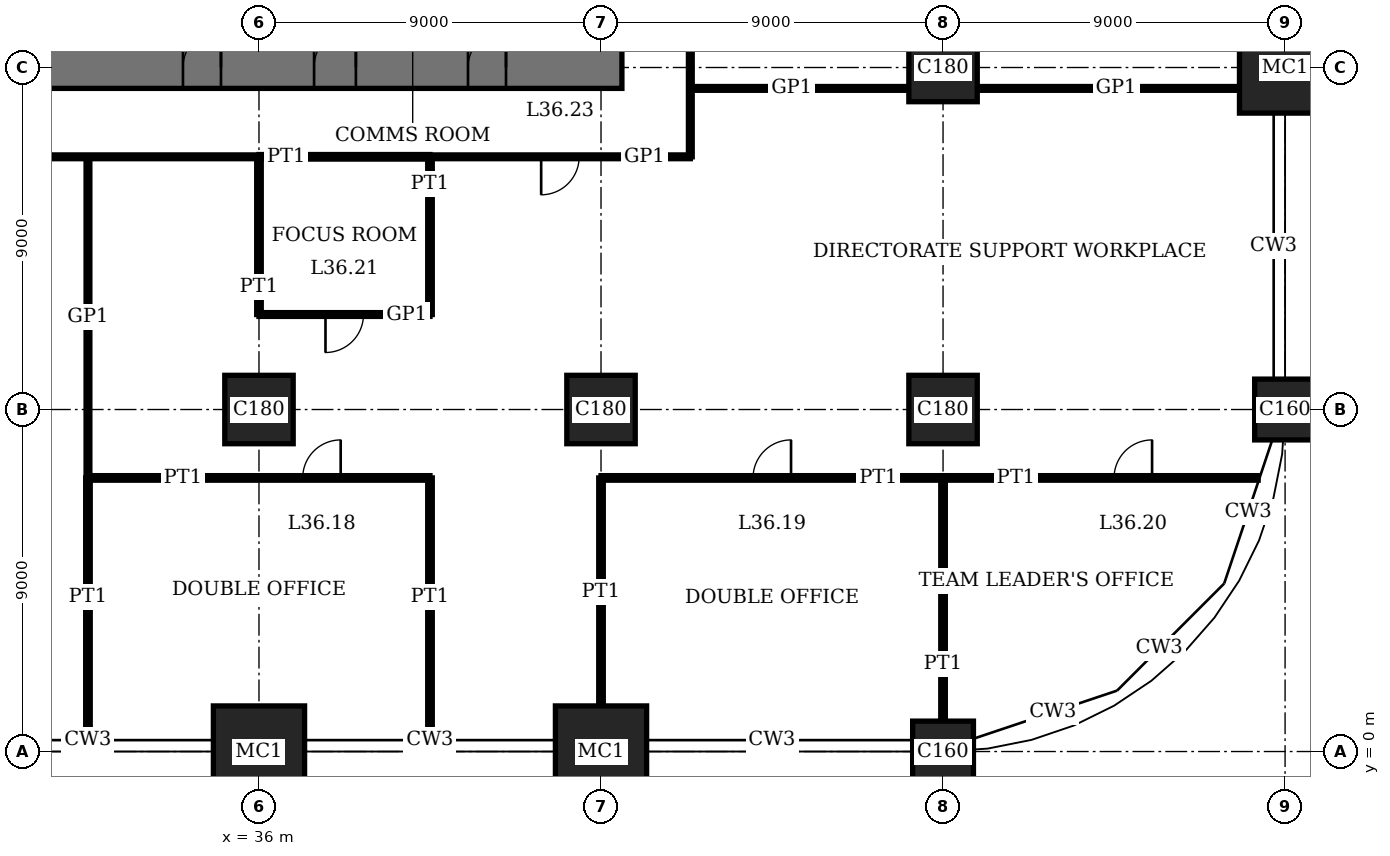
"""IFC4 building model, lengths in metres.
Left out: names, types, materials, properties, quantities, classifications, styles, units other than length and angle.
Written with IfcOpenShell. Run it as: python <this file> out.ifc"""

import sys

from ifc_helpers import new_model, si_unit, direction, frame, frame_2d, origin, origin_2d, place, context, subcontext, project, spatial, rectangle, extrude, element, fill, save


model = new_model("IFC4")
c1 = context("Model", 3, precision=1e-05, world=origin(), true_north=direction((0.0, 1.0)))
c2 = subcontext(c1, "Body", "Model", "MODEL_VIEW")
j1 = project(units=[si_unit("LENGTHUNIT", "METRE"), si_unit("PLANEANGLEUNIT", "RADIAN")], contexts=[c1])
p1 = place(None, origin())
s1 = spatial("IfcSite", under=j1, at=p1, CompositionType="ELEMENT")
p2 = place(p1, origin())
s2 = spatial("IfcBuilding", under=s1, at=p2, CompositionType="ELEMENT")
p3 = place(p2, frame((0.0, 0.0, 149.0)))
s3 = spatial("IfcBuildingStorey", under=s2, at=p3, CompositionType="ELEMENT", Elevation=149.0)
p4 = place(p3, frame((36.0, 0.0, 0.0), z_axis=(0.0, 0.0, 1.0), x_axis=(1.0, 0.0, 0.0)))
e1 = element("IfcColumn", 1, at=p4, inside=s3, PredefinedType="COLUMN", context=c2, shape_type="SweptSolid", body=[
    extrude(rectangle(XDim=2.4, YDim=2.4, at=origin_2d()), origin(), (0.0, 0.0, 1.0), 4.0),
])
p5 = place(p3, frame((36.0, 9.0, 0.0), z_axis=(0.0, 0.0, 1.0), x_axis=(1.0, 0.0, 0.0)))
e2 = element("IfcColumn", 2, at=p5, inside=s3, PredefinedType="COLUMN", context=c2, shape_type="SweptSolid", body=[
    extrude(rectangle(XDim=1.8, YDim=1.8, at=origin_2d()), origin(), (0.0, 0.0, 1.0), 4.0),
])
p6 = place(p3, frame((45.0, 0.0, 0.0), z_axis=(0.0, 0.0, 1.0), x_axis=(1.0, 0.0, 0.0)))
e3 = element("IfcColumn", 3, at=p6, inside=s3, PredefinedType="COLUMN", context=c2, shape_type="SweptSolid", body=[
    extrude(rectangle(XDim=2.4, YDim=2.4, at=origin_2d()), origin(), (0.0, 0.0, 1.0), 4.0),
])
p7 = place(p3, frame((45.0, 9.0, 0.0), z_axis=(0.0, 0.0, 1.0), x_axis=(1.0, 0.0, 0.0)))
e4 = element("IfcColumn", 4, at=p7, inside=s3, PredefinedType="COLUMN", context=c2, shape_type="SweptSolid", body=[
    extrude(rectangle(XDim=1.8, YDim=1.8, at=origin_2d()), origin(), (0.0, 0.0, 1.0), 4.0),
])
p8 = place(p3, frame((54.0, 0.0, 0.0), z_axis=(0.0, 0.0, 1.0), x_axis=(1.0, 0.0, 0.0)))
e5 = element("IfcColumn", 5, at=p8, inside=s3, PredefinedType="COLUMN", context=c2, shape_type="SweptSolid", body=[
    extrude(rectangle(XDim=1.6, YDim=1.6, at=origin_2d()), origin(), (0.0, 0.0, 1.0), 4.0),
])
for number, where, z_axis, x_axis in (
    (6, (54.0, 9.0, 0.0), (0.0, 0.0, 1.0), (1.0, 0.0, 0.0)),
    (7, (54.0, 18.0, 0.0), (0.0, 0.0, 1.0), (1.0, 0.0, 0.0)),
):
    element("IfcColumn", number, at=place(p3, frame(where, z_axis=z_axis, x_axis=x_axis)), inside=s3, PredefinedType="COLUMN", context=c2, shape_type="SweptSolid", body=[
        extrude(rectangle(XDim=1.8, YDim=1.8, at=origin_2d()), origin(), (0.0, 0.0, 1.0), 4.0),
    ])
p9 = place(p3, frame((63.0, 9.0, 0.0), z_axis=(0.0, 0.0, 1.0), x_axis=(1.0, 0.0, 0.0)))
e8 = element("IfcColumn", 8, at=p9, inside=s3, PredefinedType="COLUMN", context=c2, shape_type="SweptSolid", body=[
    extrude(rectangle(XDim=1.6, YDim=1.6, at=origin_2d()), origin(), (0.0, 0.0, 1.0), 4.0),
])
p10 = place(p3, frame((63.0, 18.0, 0.0), z_axis=(0.0, 0.0, 1.0), x_axis=(1.0, 0.0, 0.0)))
e9 = element("IfcColumn", 9, at=p10, inside=s3, PredefinedType="COLUMN", context=c2, shape_type="SweptSolid", body=[
    extrude(rectangle(XDim=2.4, YDim=2.4, at=origin_2d()), origin(), (0.0, 0.0, 1.0), 4.0),
])
p11 = place(p3, frame((17.45, 18.0, 0.0), z_axis=(0.0, 0.0, 1.0), x_axis=(1.0, 0.0, 0.0)))
e10 = element("IfcWall", 10, at=p11, inside=s3, PredefinedType="SHEAR", context=c2, shape_type="SweptSolid", body=[
    extrude(rectangle(XDim=28.1, YDim=1.1, at=frame_2d((14.05, 0.0))), origin(), (0.0, 0.0, 1.0), 4.0),
])
p12 = place(p11, frame((11.55, 0.0, 0.0)))
e11 = element("IfcOpeningElement", 11, at=p12, cuts=e10, PredefinedType="OPENING", context=c2, shape_type="SweptSolid", body=[
    extrude(rectangle(XDim=1.0, YDim=2.4, at=frame_2d((0.5, 1.2))), frame((0.0, 0.56, 0.0), z_axis=(0.0, -1.0, 0.0), x_axis=(1.0, 0.0, 0.0)), (0.0, 0.0, 1.0), 1.12),
])
p13 = place(p11, frame((16.55, 0.0, 0.0)))
e12 = element("IfcOpeningElement", 12, at=p13, cuts=e10, PredefinedType="OPENING", context=c2, shape_type="SweptSolid", body=[
    extrude(rectangle(XDim=1.0, YDim=2.4, at=frame_2d((0.5, 1.2))), frame((0.0, 0.56, 0.0), z_axis=(0.0, -1.0, 0.0), x_axis=(1.0, 0.0, 0.0)), (0.0, 0.0, 1.0), 1.12),
])
p14 = place(p11, frame((20.0, 0.0, 0.0)))
e13 = element("IfcOpeningElement", 13, at=p14, cuts=e10, PredefinedType="OPENING", context=c2, shape_type="SweptSolid", body=[
    extrude(rectangle(XDim=1.1, YDim=2.4, at=frame_2d((0.55, 1.2))), frame((0.0, 0.56, 0.0), z_axis=(0.0, -1.0, 0.0), x_axis=(1.0, 0.0, 0.0)), (0.0, 0.0, 1.0), 1.12),
])
p15 = place(p11, frame((24.05, 0.0, 0.0)))
e14 = element("IfcOpeningElement", 14, at=p15, cuts=e10, PredefinedType="OPENING", context=c2, shape_type="SweptSolid", body=[
    extrude(rectangle(XDim=1.0, YDim=2.4, at=frame_2d((0.5, 1.2))), frame((0.0, 0.56, 0.0), z_axis=(0.0, -1.0, 0.0), x_axis=(1.0, 0.0, 0.0)), (0.0, 0.0, 1.0), 1.12),
])
p16 = place(p3, frame((31.5, 7.2, 0.0), z_axis=(0.0, 0.0, 1.0), x_axis=(1.0, 0.0, 0.0)))
e15 = element("IfcWall", 15, at=p16, inside=s3, PredefinedType="PARTITIONING", context=c2, shape_type="SweptSolid", body=[
    extrude(rectangle(XDim=9.0, YDim=0.12, at=frame_2d((4.5, 0.0))), origin(), (0.0, 0.0, 1.0), 3.75),
])
p17 = place(p16, frame((5.65, 0.0, 0.0)))
e16 = element("IfcOpeningElement", 16, at=p17, cuts=e15, PredefinedType="OPENING", context=c2, shape_type="SweptSolid", body=[
    extrude(rectangle(XDim=1.0, YDim=2.4, at=frame_2d((0.5, 1.2))), frame((0.0, 0.07, 0.0), z_axis=(0.0, -1.0, 0.0), x_axis=(1.0, 0.0, 0.0)), (0.0, 0.0, 1.0), 0.14),
])
p18 = place(p3, frame((45.0, 7.2, 0.0), z_axis=(0.0, 0.0, 1.0), x_axis=(1.0, 0.0, 0.0)))
e17 = element("IfcWall", 17, at=p18, inside=s3, PredefinedType="PARTITIONING", context=c2, shape_type="SweptSolid", body=[
    extrude(rectangle(XDim=9.0, YDim=0.12, at=frame_2d((4.5, 0.0))), origin(), (0.0, 0.0, 1.0), 3.75),
])
p19 = place(p18, frame((4.0, 0.0, 0.0)))
e18 = element("IfcOpeningElement", 18, at=p19, cuts=e17, PredefinedType="OPENING", context=c2, shape_type="SweptSolid", body=[
    extrude(rectangle(XDim=1.0, YDim=2.4, at=frame_2d((0.5, 1.2))), frame((0.0, 0.07, 0.0), z_axis=(0.0, -1.0, 0.0), x_axis=(1.0, 0.0, 0.0)), (0.0, 0.0, 1.0), 0.14),
])
p20 = place(p3, frame((54.0, 7.2, 0.0), z_axis=(0.0, 0.0, 1.0), x_axis=(1.0, 0.0, 0.0)))
e19 = element("IfcWall", 19, at=p20, inside=s3, PredefinedType="PARTITIONING", context=c2, shape_type="SweptSolid", body=[
    extrude(rectangle(XDim=8.291, YDim=0.12, at=frame_2d((4.146, 0.0))), origin(), (0.0, 0.0, 1.0), 3.75),
])
p21 = place(p20, frame((4.5, 0.0, 0.0)))
e20 = element("IfcOpeningElement", 20, at=p21, cuts=e19, PredefinedType="OPENING", context=c2, shape_type="SweptSolid", body=[
    extrude(rectangle(XDim=1.0, YDim=2.4, at=frame_2d((0.5, 1.2))), frame((0.0, 0.07, 0.0), z_axis=(0.0, -1.0, 0.0), x_axis=(1.0, 0.0, 0.0)), (0.0, 0.0, 1.0), 0.14),
])
p22 = place(p3, frame((36.0, 11.5, 0.0), z_axis=(0.0, 0.0, 1.0), x_axis=(1.0, 0.0, 0.0)))
e21 = element("IfcWall", 21, at=p22, inside=s3, PredefinedType="PARTITIONING", context=c2, shape_type="SweptSolid", body=[
    extrude(rectangle(XDim=4.5, YDim=0.1, at=frame_2d((2.25, 0.0))), origin(), (0.0, 0.0, 1.0), 3.75),
])
p23 = place(p22, frame((1.75, 0.0, 0.0)))
e22 = element("IfcOpeningElement", 22, at=p23, cuts=e21, PredefinedType="OPENING", context=c2, shape_type="SweptSolid", body=[
    extrude(rectangle(XDim=1.0, YDim=2.4, at=frame_2d((0.5, 1.2))), frame((0.0, 0.06, 0.0), z_axis=(0.0, -1.0, 0.0), x_axis=(1.0, 0.0, 0.0)), (0.0, 0.0, 1.0), 0.12),
])
p24 = place(p3, frame((36.0, 15.65, 0.0), z_axis=(0.0, 0.0, 1.0), x_axis=(1.0, 0.0, 0.0)))
e23 = element("IfcWall", 23, at=p24, inside=s3, PredefinedType="PARTITIONING", context=c2, shape_type="SweptSolid", body=[
    extrude(rectangle(XDim=4.5, YDim=0.12, at=frame_2d((2.25, 0.0))), origin(), (0.0, 0.0, 1.0), 3.75),
])
p25 = place(p3, frame((15.65, 15.65, 0.0), z_axis=(0.0, 0.0, 1.0), x_axis=(1.0, 0.0, 0.0)))
e24 = element("IfcWall", 24, at=p25, inside=s3, PredefinedType="PARTITIONING", context=c2, shape_type="SweptSolid", body=[
    extrude(rectangle(XDim=20.35, YDim=0.1, at=frame_2d((10.175, 0.0))), origin(), (0.0, 0.0, 1.0), 3.75),
])
p26 = place(p25, frame((9.675, 0.0, 0.0)))
e25 = element("IfcOpeningElement", 25, at=p26, cuts=e24, PredefinedType="OPENING", context=c2, shape_type="SweptSolid", body=[
    extrude(rectangle(XDim=1.0, YDim=2.4, at=frame_2d((0.5, 1.2))), frame((0.0, 0.06, 0.0), z_axis=(0.0, -1.0, 0.0), x_axis=(1.0, 0.0, 0.0)), (0.0, 0.0, 1.0), 0.12),
])
p27 = place(p3, frame((40.5, 15.65, 0.0), z_axis=(0.0, 0.0, 1.0), x_axis=(1.0, 0.0, 0.0)))
e26 = element("IfcWall", 26, at=p27, inside=s3, PredefinedType="PARTITIONING", context=c2, shape_type="SweptSolid", body=[
    extrude(rectangle(XDim=6.85, YDim=0.1, at=frame_2d((3.425, 0.0))), origin(), (0.0, 0.0, 1.0), 3.75),
])
p28 = place(p27, frame((2.925, 0.0, 0.0)))
e27 = element("IfcOpeningElement", 27, at=p28, cuts=e26, PredefinedType="OPENING", context=c2, shape_type="SweptSolid", body=[
    extrude(rectangle(XDim=1.0, YDim=2.4, at=frame_2d((0.5, 1.2))), frame((0.0, 0.06, 0.0), z_axis=(0.0, -1.0, 0.0), x_axis=(1.0, 0.0, 0.0)), (0.0, 0.0, 1.0), 0.12),
])
p29 = place(p3, frame((47.35, 17.45, 0.0), z_axis=(0.0, 0.0, 1.0), x_axis=(1.0, 0.0, 0.0)))
e28 = element("IfcWall", 28, at=p29, inside=s3, PredefinedType="PARTITIONING", context=c2, shape_type="SweptSolid", body=[
    extrude(rectangle(XDim=5.75, YDim=0.1, at=frame_2d((2.875, 0.0))), origin(), (0.0, 0.0, 1.0), 3.05),
])
p30 = place(p3, frame((54.9, 17.45, 0.0), z_axis=(0.0, 0.0, 1.0), x_axis=(1.0, 0.0, 0.0)))
e29 = element("IfcWall", 29, at=p30, inside=s3, PredefinedType="PARTITIONING", context=c2, shape_type="SweptSolid", body=[
    extrude(rectangle(XDim=6.9, YDim=0.1, at=frame_2d((3.45, 0.0))), origin(), (0.0, 0.0, 1.0), 3.05),
])
p31 = place(p3, frame((31.5, 0.31, 0.0), z_axis=(0.0, 0.0, 1.0), x_axis=(0.0, 1.0, 0.0)))
e30 = element("IfcWall", 30, at=p31, inside=s3, PredefinedType="PARTITIONING", context=c2, shape_type="SweptSolid", body=[
    extrude(rectangle(XDim=6.89, YDim=0.12, at=frame_2d((3.445, 0.0))), origin(), (0.0, 0.0, 1.0), 3.75),
])
p32 = place(p3, frame((31.5, 7.2, 0.0), z_axis=(0.0, 0.0, 1.0), x_axis=(0.0, 1.0, 0.0)))
e31 = element("IfcWall", 31, at=p32, inside=s3, PredefinedType="PARTITIONING", context=c2, shape_type="SweptSolid", body=[
    extrude(rectangle(XDim=8.45, YDim=0.1, at=frame_2d((4.225, 0.0))), origin(), (0.0, 0.0, 1.0), 3.75),
])
p33 = place(p3, frame((36.0, 11.5, 0.0), z_axis=(0.0, 0.0, 1.0), x_axis=(0.0, 1.0, 0.0)))
e32 = element("IfcWall", 32, at=p33, inside=s3, PredefinedType="PARTITIONING", context=c2, shape_type="SweptSolid", body=[
    extrude(rectangle(XDim=4.15, YDim=0.12, at=frame_2d((2.075, 0.0))), origin(), (0.0, 0.0, 1.0), 3.05),
])
p34 = place(p3, frame((40.5, 0.31, 0.0), z_axis=(0.0, 0.0, 1.0), x_axis=(0.0, 1.0, 0.0)))
e33 = element("IfcWall", 33, at=p34, inside=s3, PredefinedType="PARTITIONING", context=c2, shape_type="SweptSolid", body=[
    extrude(rectangle(XDim=6.89, YDim=0.12, at=frame_2d((3.445, 0.0))), origin(), (0.0, 0.0, 1.0), 3.75),
])
p35 = place(p3, frame((40.5, 11.5, 0.0), z_axis=(0.0, 0.0, 1.0), x_axis=(0.0, 1.0, 0.0)))
e34 = element("IfcWall", 34, at=p35, inside=s3, PredefinedType="PARTITIONING", context=c2, shape_type="SweptSolid", body=[
    extrude(rectangle(XDim=4.15, YDim=0.12, at=frame_2d((2.075, 0.0))), origin(), (0.0, 0.0, 1.0), 3.75),
])
p36 = place(p3, frame((45.0, 1.2, 0.0), z_axis=(0.0, 0.0, 1.0), x_axis=(0.0, 1.0, 0.0)))
e35 = element("IfcWall", 35, at=p36, inside=s3, PredefinedType="PARTITIONING", context=c2, shape_type="SweptSolid", body=[
    extrude(rectangle(XDim=6.0, YDim=0.12, at=frame_2d((3.0, 0.0))), origin(), (0.0, 0.0, 1.0), 3.05),
])
p37 = place(p3, frame((47.35, 15.65, 0.0), z_axis=(0.0, 0.0, 1.0), x_axis=(0.0, 1.0, 0.0)))
e36 = element("IfcWall", 36, at=p37, inside=s3, PredefinedType="PARTITIONING", context=c2, shape_type="SweptSolid", body=[
    extrude(rectangle(XDim=11.35, YDim=0.1, at=frame_2d((5.675, 0.0))), origin(), (0.0, 0.0, 1.0), 3.75),
])
p38 = place(p37, frame((5.175, 0.0, 0.0)))
e37 = element("IfcOpeningElement", 37, at=p38, cuts=e36, PredefinedType="OPENING", context=c2, shape_type="SweptSolid", body=[
    extrude(rectangle(XDim=1.0, YDim=2.4, at=frame_2d((0.5, 1.2))), frame((0.0, 0.06, 0.0), z_axis=(0.0, -1.0, 0.0), x_axis=(1.0, 0.0, 0.0)), (0.0, 0.0, 1.0), 0.12),
])
p39 = place(p3, frame((54.0, 0.8, 0.0), z_axis=(0.0, 0.0, 1.0), x_axis=(0.0, 1.0, 0.0)))
e38 = element("IfcWall", 38, at=p39, inside=s3, PredefinedType="PARTITIONING", context=c2, shape_type="SweptSolid", body=[
    extrude(rectangle(XDim=6.4, YDim=0.12, at=frame_2d((3.2, 0.0))), origin(), (0.0, 0.0, 1.0), 3.05),
])
p40 = place(p13, origin())
e39 = element("IfcDoor", 39, at=p40, inside=s3, OperationType="SINGLE_SWING_LEFT", PredefinedType="DOOR", context=c2, shape_type="SweptSolid", body=[
    extrude(rectangle(XDim=1.0, YDim=2.4, at=frame_2d((0.5, 1.2))), frame((0.0, 0.025, 0.0), z_axis=(0.0, -1.0, 0.0), x_axis=(1.0, 0.0, 0.0)), (0.0, 0.0, 1.0), 0.05),
    extrude(rectangle(XDim=0.04, YDim=2.4, at=frame_2d((0.02, 1.2))), frame((0.0, 0.4, 0.0), z_axis=(0.0, -1.0, 0.0), x_axis=(1.0, 0.0, 0.0)), (0.0, 0.0, 1.0), 0.8),
    extrude(rectangle(XDim=0.04, YDim=2.4, at=frame_2d((0.98, 1.2))), frame((0.0, 0.4, 0.0), z_axis=(0.0, -1.0, 0.0), x_axis=(1.0, 0.0, 0.0)), (0.0, 0.0, 1.0), 0.8),
    extrude(rectangle(XDim=1.0, YDim=0.04, at=frame_2d((0.5, 2.38))), frame((0.0, 0.4, 0.0), z_axis=(0.0, -1.0, 0.0), x_axis=(1.0, 0.0, 0.0)), (0.0, 0.0, 1.0), 0.8),
])
fill(e12, e39)
p41 = place(p14, origin())
e40 = element("IfcDoor", 40, at=p41, inside=s3, OperationType="SINGLE_SWING_LEFT", PredefinedType="DOOR", context=c2, shape_type="SweptSolid", body=[
    extrude(rectangle(XDim=1.1, YDim=2.4, at=frame_2d((0.55, 1.2))), frame((0.0, 0.025, 0.0), z_axis=(0.0, -1.0, 0.0), x_axis=(1.0, 0.0, 0.0)), (0.0, 0.0, 1.0), 0.05),
    extrude(rectangle(XDim=0.04, YDim=2.4, at=frame_2d((0.02, 1.2))), frame((0.0, 0.44, 0.0), z_axis=(0.0, -1.0, 0.0), x_axis=(1.0, 0.0, 0.0)), (0.0, 0.0, 1.0), 0.88),
    extrude(rectangle(XDim=0.04, YDim=2.4, at=frame_2d((1.08, 1.2))), frame((0.0, 0.44, 0.0), z_axis=(0.0, -1.0, 0.0), x_axis=(1.0, 0.0, 0.0)), (0.0, 0.0, 1.0), 0.88),
    extrude(rectangle(XDim=1.1, YDim=0.04, at=frame_2d((0.55, 2.38))), frame((0.0, 0.44, 0.0), z_axis=(0.0, -1.0, 0.0), x_axis=(1.0, 0.0, 0.0)), (0.0, 0.0, 1.0), 0.88),
])
fill(e13, e40)
p42 = place(p15, origin())
e41 = element("IfcDoor", 41, at=p42, inside=s3, OperationType="SINGLE_SWING_LEFT", PredefinedType="DOOR", context=c2, shape_type="SweptSolid", body=[
    extrude(rectangle(XDim=1.0, YDim=2.4, at=frame_2d((0.5, 1.2))), frame((0.0, 0.025, 0.0), z_axis=(0.0, -1.0, 0.0), x_axis=(1.0, 0.0, 0.0)), (0.0, 0.0, 1.0), 0.05),
    extrude(rectangle(XDim=0.04, YDim=2.4, at=frame_2d((0.02, 1.2))), frame((0.0, 0.4, 0.0), z_axis=(0.0, -1.0, 0.0), x_axis=(1.0, 0.0, 0.0)), (0.0, 0.0, 1.0), 0.8),
    extrude(rectangle(XDim=0.04, YDim=2.4, at=frame_2d((0.98, 1.2))), frame((0.0, 0.4, 0.0), z_axis=(0.0, -1.0, 0.0), x_axis=(1.0, 0.0, 0.0)), (0.0, 0.0, 1.0), 0.8),
    extrude(rectangle(XDim=1.0, YDim=0.04, at=frame_2d((0.5, 2.38))), frame((0.0, 0.4, 0.0), z_axis=(0.0, -1.0, 0.0), x_axis=(1.0, 0.0, 0.0)), (0.0, 0.0, 1.0), 0.8),
])
fill(e14, e41)
p43 = place(p17, origin())
e42 = element("IfcDoor", 42, at=p43, inside=s3, OperationType="SINGLE_SWING_LEFT", PredefinedType="DOOR", context=c2, shape_type="SweptSolid", body=[
    extrude(rectangle(XDim=1.0, YDim=2.4, at=frame_2d((0.5, 1.2))), frame((0.0, 0.025, 0.0), z_axis=(0.0, -1.0, 0.0), x_axis=(1.0, 0.0, 0.0)), (0.0, 0.0, 1.0), 0.05),
])
fill(e16, e42)
p44 = place(p19, origin())
e43 = element("IfcDoor", 43, at=p44, inside=s3, OperationType="SINGLE_SWING_LEFT", PredefinedType="DOOR", context=c2, shape_type="SweptSolid", body=[
    extrude(rectangle(XDim=1.0, YDim=2.4, at=frame_2d((0.5, 1.2))), frame((0.0, 0.025, 0.0), z_axis=(0.0, -1.0, 0.0), x_axis=(1.0, 0.0, 0.0)), (0.0, 0.0, 1.0), 0.05),
])
fill(e18, e43)
p45 = place(p21, origin())
e44 = element("IfcDoor", 44, at=p45, inside=s3, OperationType="SINGLE_SWING_LEFT", PredefinedType="DOOR", context=c2, shape_type="SweptSolid", body=[
    extrude(rectangle(XDim=1.0, YDim=2.4, at=frame_2d((0.5, 1.2))), frame((0.0, 0.025, 0.0), z_axis=(0.0, -1.0, 0.0), x_axis=(1.0, 0.0, 0.0)), (0.0, 0.0, 1.0), 0.05),
])
fill(e20, e44)
p46 = place(p23, origin())
e45 = element("IfcDoor", 45, at=p46, inside=s3, OperationType="SINGLE_SWING_LEFT", PredefinedType="DOOR", context=c2, shape_type="SweptSolid", body=[
    extrude(rectangle(XDim=1.0, YDim=2.4, at=frame_2d((0.5, 1.2))), frame((0.0, 0.02, 0.0), z_axis=(0.0, -1.0, 0.0), x_axis=(1.0, 0.0, 0.0)), (0.0, 0.0, 1.0), 0.04),
])
fill(e22, e45)
p47 = place(p28, origin())
e46 = element("IfcDoor", 46, at=p47, inside=s3, OperationType="SINGLE_SWING_LEFT", PredefinedType="DOOR", context=c2, shape_type="SweptSolid", body=[
    extrude(rectangle(XDim=1.0, YDim=2.4, at=frame_2d((0.5, 1.2))), frame((0.0, 0.02, 0.0), z_axis=(0.0, -1.0, 0.0), x_axis=(1.0, 0.0, 0.0)), (0.0, 0.0, 1.0), 0.04),
])
fill(e27, e46)
save(model, sys.argv[1])
